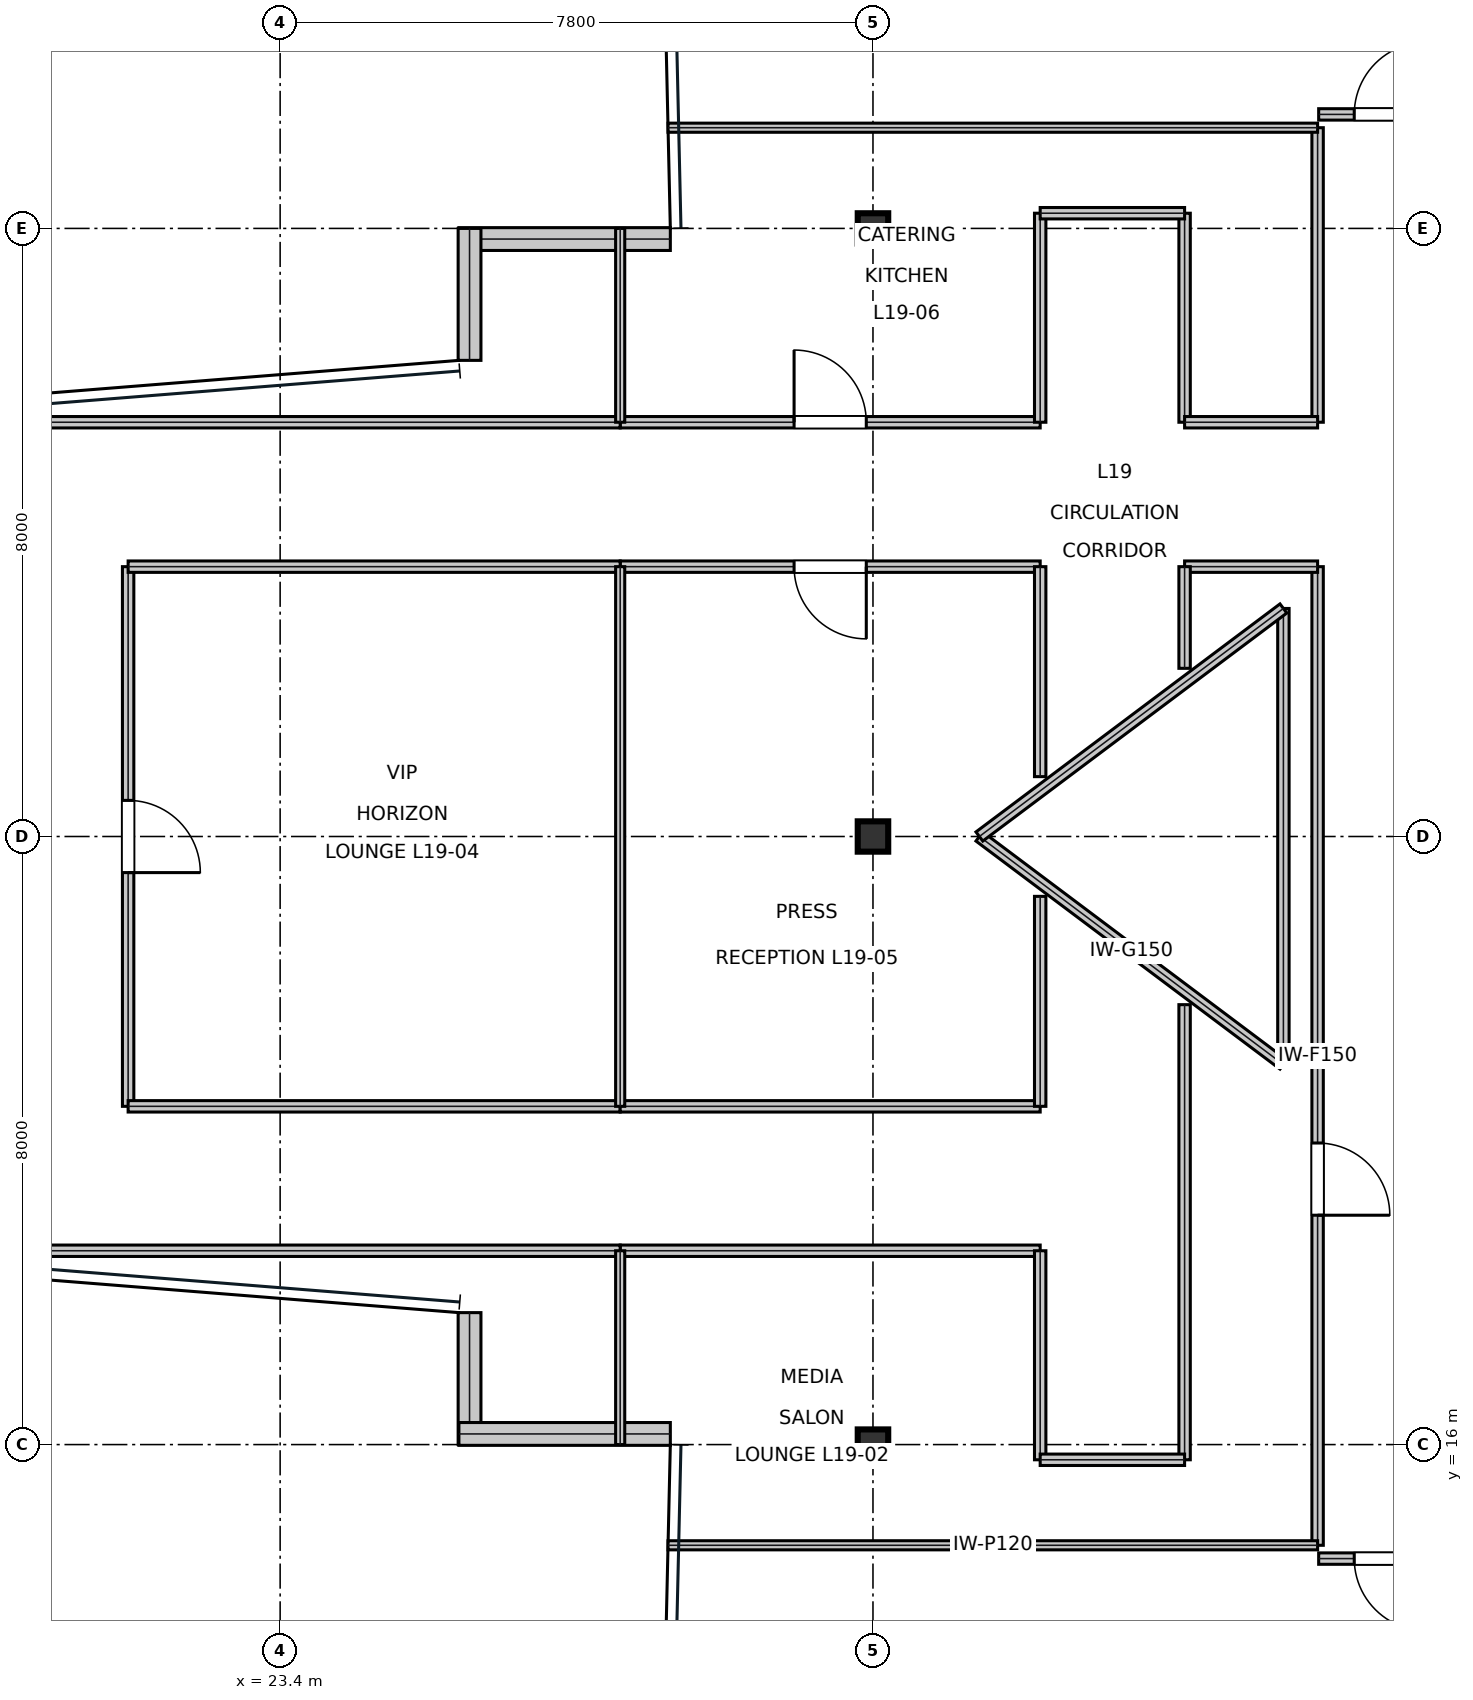
"""IFC4 building model, lengths in metres.
Left out: names, types, materials, properties, quantities, classifications, styles, units other than length and angle.
Written with IfcOpenShell. Run it as: python <this file> out.ifc"""

import sys

from ifc_helpers import new_model, si_unit, direction, frame, frame_2d, origin, origin_2d, place, context, subcontext, project, spatial, rectangle, i_section, extrude, element, fill, save


model = new_model("IFC4")
c1 = context("Model", 3, precision=1e-05, world=origin(), true_north=direction((0.0, 1.0)))
c2 = subcontext(c1, "Body", "Model", "MODEL_VIEW")
j1 = project(units=[si_unit("LENGTHUNIT", "METRE"), si_unit("PLANEANGLEUNIT", "RADIAN")], contexts=[c1])
p1 = place(None, origin())
s1 = spatial("IfcSite", under=j1, at=p1, CompositionType="ELEMENT")
p2 = place(p1, origin())
s2 = spatial("IfcBuilding", under=s1, at=p2, CompositionType="ELEMENT")
p3 = place(p2, frame((0.0, 0.0, 86.4)))
s3 = spatial("IfcBuildingStorey", under=s2, at=p3, CompositionType="ELEMENT", Elevation=86.4)
for number, where, z_axis, x_axis in (
    (1, (31.2, 16.0, 0.0), (0.0, 0.0, 1.0), (1.0, 0.0, 0.0)),
    (2, (31.2, 24.0, 0.0), (0.0, 0.0, 1.0), (1.0, 0.0, 0.0)),
    (3, (31.2, 32.0, 0.0), (0.0, 0.0, 1.0), (1.0, 0.0, 0.0)),
):
    element("IfcColumn", number, at=place(p3, frame(where, z_axis=z_axis, x_axis=x_axis)), inside=s3, PredefinedType="COLUMN", context=c2, shape_type="SweptSolid", body=[
        extrude(i_section(OverallWidth=0.401, OverallDepth=0.399, WebThickness=0.025, FlangeThickness=0.04, at=origin_2d()), origin(), (0.0, 0.0, 1.0), 4.044),
    ])
p4 = place(p3, frame((28.534, 31.86, 0.0), z_axis=(0.0, 0.0, 1.0), x_axis=(-1.0, 0.0, 0.0)))
e4 = element("IfcWall", 4, at=p4, inside=s3, PredefinedType="STANDARD", context=c2, shape_type="SweptSolid", body=[
    extrude(rectangle(XDim=2.782, YDim=0.3, at=frame_2d((1.391, 0.0))), origin(), (0.0, 0.0, 1.0), 3.81),
])
for number, where, z_axis, x_axis in (
    (5, (25.892, 32.0, 0.0), (0.0, 0.0, 1.0), (0.0, -1.0, 0.0)),
    (6, (25.892, 17.736, 0.0), (0.0, 0.0, 1.0), (0.0, -1.0, 0.0)),
):
    element("IfcWall", number, at=place(p3, frame(where, z_axis=z_axis, x_axis=x_axis)), inside=s3, PredefinedType="STANDARD", context=c2, shape_type="SweptSolid", body=[
        extrude(rectangle(XDim=1.736, YDim=0.3, at=frame_2d((0.868, 0.0))), origin(), (0.0, 0.0, 1.0), 3.338),
    ])
p5 = place(p3, frame((25.752, 16.14, 0.0), z_axis=(0.0, 0.0, 1.0), x_axis=(1.0, 0.0, 0.0)))
e7 = element("IfcWall", 7, at=p5, inside=s3, PredefinedType="STANDARD", context=c2, shape_type="SweptSolid", body=[
    extrude(rectangle(XDim=2.782, YDim=0.3, at=frame_2d((1.391, 0.0))), origin(), (0.0, 0.0, 1.0), 3.81),
])
p6 = place(p3, frame((37.064, 14.5, 0.0), z_axis=(0.0, 0.0, 1.0), x_axis=(1.0, 0.0, 0.0)))
e8 = element("IfcWall", 8, at=p6, inside=s3, PredefinedType="PARTITIONING", context=c2, shape_type="SweptSolid", body=[
    extrude(rectangle(XDim=1.886, YDim=0.15, at=frame_2d((0.943, 0.0))), origin(), (0.0, 0.0, 1.0), 3.181),
])
p7 = place(p6, frame((0.468, 0.0, 0.0)))
e9 = element("IfcOpeningElement", 9, at=p7, cuts=e8, PredefinedType="OPENING", context=c2, shape_type="SweptSolid", body=[
    extrude(rectangle(XDim=0.95, YDim=2.15, at=frame_2d((0.475, 1.075))), frame((0.0, 0.085, 0.0), z_axis=(0.0, -1.0, 0.0), x_axis=(1.0, 0.0, 0.0)), (0.0, 0.0, 1.0), 0.17),
])
p8 = place(p3, frame((37.05, 14.675, 0.0), z_axis=(0.0, 0.0, 1.0), x_axis=(0.0, 1.0, 0.0)))
e10 = element("IfcWall", 10, at=p8, inside=s3, PredefinedType="PARTITIONING", context=c2, shape_type="SweptSolid", body=[
    extrude(rectangle(XDim=12.875, YDim=0.15, at=frame_2d((6.438, 0.0))), origin(), (0.0, 0.0, 1.0), 3.181),
])
p9 = place(p8, frame((4.343, 0.0, 0.0)))
e11 = element("IfcOpeningElement", 11, at=p9, cuts=e10, PredefinedType="OPENING", context=c2, shape_type="SweptSolid", body=[
    extrude(rectangle(XDim=0.95, YDim=2.15, at=frame_2d((0.475, 1.075))), frame((0.0, 0.085, 0.0), z_axis=(0.0, -1.0, 0.0), x_axis=(1.0, 0.0, 0.0)), (0.0, 0.0, 1.0), 0.17),
])
p10 = place(p3, frame((21.4, 20.45, 0.0), z_axis=(0.0, 0.0, 1.0), x_axis=(0.0, 1.0, 0.0)))
e12 = element("IfcWall", 12, at=p10, inside=s3, PredefinedType="PARTITIONING", context=c2, shape_type="SweptSolid", body=[
    extrude(rectangle(XDim=7.1, YDim=0.15, at=frame_2d((3.55, 0.0))), origin(), (0.0, 0.0, 1.0), 3.181),
])
p11 = place(p10, frame((3.075, 0.0, 0.0)))
e13 = element("IfcOpeningElement", 13, at=p11, cuts=e12, PredefinedType="OPENING", context=c2, shape_type="SweptSolid", body=[
    extrude(rectangle(XDim=0.95, YDim=2.15, at=frame_2d((0.475, 1.075))), frame((0.0, 0.085, 0.0), z_axis=(0.0, -1.0, 0.0), x_axis=(1.0, 0.0, 0.0)), (0.0, 0.0, 1.0), 0.17),
])
p12 = place(p3, frame((27.874, 27.55, 0.0), z_axis=(0.0, 0.0, 1.0), x_axis=(1.0, 0.0, 0.0)))
e14 = element("IfcWall", 14, at=p12, inside=s3, PredefinedType="PARTITIONING", context=c2, shape_type="SweptSolid", body=[
    extrude(rectangle(XDim=5.526, YDim=0.15, at=frame_2d((2.763, 0.0))), origin(), (0.0, 0.0, 1.0), 3.181),
])
p13 = place(p12, frame((2.288, 0.0, 0.0)))
e15 = element("IfcOpeningElement", 15, at=p13, cuts=e14, PredefinedType="OPENING", context=c2, shape_type="SweptSolid", body=[
    extrude(rectangle(XDim=0.95, YDim=2.15, at=frame_2d((0.475, 1.075))), frame((0.0, 0.085, 0.0), z_axis=(0.0, -1.0, 0.0), x_axis=(1.0, 0.0, 0.0)), (0.0, 0.0, 1.0), 0.17),
])
p14 = place(p3, frame((27.874, 29.45, 0.0), z_axis=(0.0, 0.0, 1.0), x_axis=(1.0, 0.0, 0.0)))
e16 = element("IfcWall", 16, at=p14, inside=s3, PredefinedType="PARTITIONING", context=c2, shape_type="SweptSolid", body=[
    extrude(rectangle(XDim=5.526, YDim=0.15, at=frame_2d((2.763, 0.0))), origin(), (0.0, 0.0, 1.0), 3.181),
])
p15 = place(p14, frame((2.288, 0.0, 0.0)))
e17 = element("IfcOpeningElement", 17, at=p15, cuts=e16, PredefinedType="OPENING", context=c2, shape_type="SweptSolid", body=[
    extrude(rectangle(XDim=0.95, YDim=2.15, at=frame_2d((0.475, 1.075))), frame((0.0, 0.085, 0.0), z_axis=(0.0, -1.0, 0.0), x_axis=(1.0, 0.0, 0.0)), (0.0, 0.0, 1.0), 0.17),
])
p16 = place(p3, frame((37.064, 33.5, 0.0), z_axis=(0.0, 0.0, 1.0), x_axis=(1.0, 0.0, 0.0)))
e18 = element("IfcWall", 18, at=p16, inside=s3, PredefinedType="PARTITIONING", context=c2, shape_type="SweptSolid", body=[
    extrude(rectangle(XDim=1.886, YDim=0.15, at=frame_2d((0.943, 0.0))), origin(), (0.0, 0.0, 1.0), 3.181),
])
p17 = place(p16, frame((0.468, 0.0, 0.0)))
e19 = element("IfcOpeningElement", 19, at=p17, cuts=e18, PredefinedType="OPENING", context=c2, shape_type="SweptSolid", body=[
    extrude(rectangle(XDim=0.95, YDim=2.15, at=frame_2d((0.475, 1.075))), frame((0.0, 0.085, 0.0), z_axis=(0.0, -1.0, 0.0), x_axis=(1.0, 0.0, 0.0)), (0.0, 0.0, 1.0), 0.17),
])
p18 = place(p3, frame((35.3, 15.8, 0.0), z_axis=(0.0, 0.0, 1.0), x_axis=(0.0, 1.0, 0.0)))
e20 = element("IfcWall", 20, at=p18, inside=s3, PredefinedType="PARTITIONING", context=c2, shape_type="SweptSolid", body=[
    extrude(rectangle(XDim=5.988, YDim=0.15, at=frame_2d((2.994, 0.0))), origin(), (0.0, 0.0, 1.0), 3.181),
])
p19 = place(p3, frame((27.874, 18.55, 0.0), z_axis=(0.0, 0.0, 1.0), x_axis=(1.0, 0.0, 0.0)))
e21 = element("IfcWall", 21, at=p19, inside=s3, PredefinedType="PARTITIONING", context=c2, shape_type="SweptSolid", body=[
    extrude(rectangle(XDim=5.526, YDim=0.15, at=frame_2d((2.763, 0.0))), origin(), (0.0, 0.0, 1.0), 3.181),
])
p20 = place(p3, frame((33.4, 15.8, 0.0), z_axis=(0.0, 0.0, 1.0), x_axis=(0.0, 1.0, 0.0)))
e22 = element("IfcWall", 22, at=p20, inside=s3, PredefinedType="PARTITIONING", context=c2, shape_type="SweptSolid", body=[
    extrude(rectangle(XDim=2.75, YDim=0.15, at=frame_2d((1.375, 0.0))), origin(), (0.0, 0.0, 1.0), 3.181),
])
p21 = place(p3, frame((33.4, 15.8, 0.0), z_axis=(0.0, 0.0, 1.0), x_axis=(1.0, 0.0, 0.0)))
e23 = element("IfcWall", 23, at=p21, inside=s3, PredefinedType="PARTITIONING", context=c2, shape_type="SweptSolid", body=[
    extrude(rectangle(XDim=1.9, YDim=0.15, at=frame_2d((0.95, 0.0))), origin(), (0.0, 0.0, 1.0), 3.181),
])
p22 = place(p3, frame((35.3, 27.55, 0.0), z_axis=(0.0, 0.0, 1.0), x_axis=(1.0, 0.0, 0.0)))
e24 = element("IfcWall", 24, at=p22, inside=s3, PredefinedType="PARTITIONING", context=c2, shape_type="SweptSolid", body=[
    extrude(rectangle(XDim=1.75, YDim=0.15, at=frame_2d((0.875, 0.0))), origin(), (0.0, 0.0, 1.0), 3.391),
])
p23 = place(p3, frame((35.3, 26.212, 0.0), z_axis=(0.0, 0.0, 1.0), x_axis=(0.0, 1.0, 0.0)))
e25 = element("IfcWall", 25, at=p23, inside=s3, PredefinedType="PARTITIONING", context=c2, shape_type="SweptSolid", body=[
    extrude(rectangle(XDim=1.338, YDim=0.15, at=frame_2d((0.669, 0.0))), origin(), (0.0, 0.0, 1.0), 3.81),
])
for number, where, z_axis, x_axis in (
    (26, (15.674, 18.55, 0.0), (0.0, 0.0, 1.0), (1.0, 0.0, 0.0)),
    (27, (15.674, 29.45, 0.0), (0.0, 0.0, 1.0), (1.0, 0.0, 0.0)),
):
    element("IfcWall", number, at=place(p3, frame(where, z_axis=z_axis, x_axis=x_axis)), inside=s3, PredefinedType="PARTITIONING", context=c2, shape_type="SweptSolid", body=[
        extrude(rectangle(XDim=12.2, YDim=0.15, at=frame_2d((6.1, 0.0))), origin(), (0.0, 0.0, 1.0), 3.338),
    ])
for number, where, z_axis, x_axis in (
    (28, (21.4, 27.55, 0.0), (0.0, 0.0, 1.0), (1.0, 0.0, 0.0)),
    (29, (21.4, 20.45, 0.0), (0.0, 0.0, 1.0), (1.0, 0.0, 0.0)),
):
    element("IfcWall", number, at=place(p3, frame(where, z_axis=z_axis, x_axis=x_axis)), inside=s3, PredefinedType="PARTITIONING", context=c2, shape_type="SweptSolid", body=[
        extrude(rectangle(XDim=6.474, YDim=0.15, at=frame_2d((3.237, 0.0))), origin(), (0.0, 0.0, 1.0), 3.391),
    ])
p24 = place(p3, frame((27.874, 20.45, 0.0), z_axis=(0.0, 0.0, 1.0), x_axis=(1.0, 0.0, 0.0)))
e30 = element("IfcWall", 30, at=p24, inside=s3, PredefinedType="PARTITIONING", context=c2, shape_type="SweptSolid", body=[
    extrude(rectangle(XDim=5.526, YDim=0.15, at=frame_2d((2.763, 0.0))), origin(), (0.0, 0.0, 1.0), 3.181),
])
for number, where, z_axis, x_axis in (
    (31, (33.4, 24.788, 0.0), (0.0, 0.0, 1.0), (0.0, 1.0, 0.0)),
    (32, (33.4, 20.45, 0.0), (0.0, 0.0, 1.0), (0.0, 1.0, 0.0)),
):
    element("IfcWall", number, at=place(p3, frame(where, z_axis=z_axis, x_axis=x_axis)), inside=s3, PredefinedType="PARTITIONING", context=c2, shape_type="SweptSolid", body=[
        extrude(rectangle(XDim=2.762, YDim=0.15, at=frame_2d((1.381, 0.0))), origin(), (0.0, 0.0, 1.0), 3.81),
    ])
p25 = place(p3, frame((37.05, 29.45, 0.0), z_axis=(0.0, 0.0, 1.0), x_axis=(0.0, 1.0, 0.0)))
e33 = element("IfcWall", 33, at=p25, inside=s3, PredefinedType="PARTITIONING", context=c2, shape_type="SweptSolid", body=[
    extrude(rectangle(XDim=3.875, YDim=0.15, at=frame_2d((1.938, 0.0))), origin(), (0.0, 0.0, 1.0), 3.181),
])
for number, where, z_axis, x_axis in (
    (34, (33.4, 29.45, 0.0), (0.0, 0.0, 1.0), (0.0, 1.0, 0.0)),
    (35, (35.3, 29.45, 0.0), (0.0, 0.0, 1.0), (0.0, 1.0, 0.0)),
):
    element("IfcWall", number, at=place(p3, frame(where, z_axis=z_axis, x_axis=x_axis)), inside=s3, PredefinedType="PARTITIONING", context=c2, shape_type="SweptSolid", body=[
        extrude(rectangle(XDim=2.75, YDim=0.15, at=frame_2d((1.375, 0.0))), origin(), (0.0, 0.0, 1.0), 3.181),
    ])
p26 = place(p3, frame((33.4, 32.2, 0.0), z_axis=(0.0, 0.0, 1.0), x_axis=(1.0, 0.0, 0.0)))
e36 = element("IfcWall", 36, at=p26, inside=s3, PredefinedType="PARTITIONING", context=c2, shape_type="SweptSolid", body=[
    extrude(rectangle(XDim=1.9, YDim=0.15, at=frame_2d((0.95, 0.0))), origin(), (0.0, 0.0, 1.0), 3.181),
])
p27 = place(p3, frame((35.3, 29.45, 0.0), z_axis=(0.0, 0.0, 1.0), x_axis=(1.0, 0.0, 0.0)))
e37 = element("IfcWall", 37, at=p27, inside=s3, PredefinedType="PARTITIONING", context=c2, shape_type="SweptSolid", body=[
    extrude(rectangle(XDim=1.75, YDim=0.15, at=frame_2d((0.875, 0.0))), origin(), (0.0, 0.0, 1.0), 3.81),
])
p28 = place(p3, frame((28.504, 14.675, 0.0), z_axis=(0.0, 0.0, 1.0), x_axis=(1.0, 0.0, 0.0)))
e38 = element("IfcWall", 38, at=p28, inside=s3, PredefinedType="PARTITIONING", context=c2, shape_type="SweptSolid", body=[
    extrude(rectangle(XDim=8.546, YDim=0.12, at=frame_2d((4.273, 0.0))), origin(), (0.0, 0.0, 1.0), 3.338),
])
for number, where, z_axis, x_axis in (
    (39, (27.874, 16.0, 0.0), (0.0, 0.0, 1.0), (0.0, 1.0, 0.0)),
    (40, (27.874, 29.45, 0.0), (0.0, 0.0, 1.0), (0.0, 1.0, 0.0)),
):
    element("IfcWall", number, at=place(p3, frame(where, z_axis=z_axis, x_axis=x_axis)), inside=s3, PredefinedType="PARTITIONING", context=c2, shape_type="SweptSolid", body=[
        extrude(rectangle(XDim=2.55, YDim=0.12, at=frame_2d((1.275, 0.0))), origin(), (0.0, 0.0, 1.0), 3.338),
    ])
p29 = place(p3, frame((27.874, 20.45, 0.0), z_axis=(0.0, 0.0, 1.0), x_axis=(0.0, 1.0, 0.0)))
e41 = element("IfcWall", 41, at=p29, inside=s3, PredefinedType="PARTITIONING", context=c2, shape_type="SweptSolid", body=[
    extrude(rectangle(XDim=7.1, YDim=0.12, at=frame_2d((3.55, 0.0))), origin(), (0.0, 0.0, 1.0), 3.181),
])
p30 = place(p3, frame((28.504, 33.325, 0.0), z_axis=(0.0, 0.0, 1.0), x_axis=(1.0, 0.0, 0.0)))
e42 = element("IfcWall", 42, at=p30, inside=s3, PredefinedType="PARTITIONING", context=c2, shape_type="SweptSolid", body=[
    extrude(rectangle(XDim=8.546, YDim=0.12, at=frame_2d((4.273, 0.0))), origin(), (0.0, 0.0, 1.0), 3.338),
])
p31 = place(p3, frame((32.6, 24.0, 0.0), z_axis=(0.0, 0.0, 1.0), x_axis=(0.8, -0.6, 0.0)))
e43 = element("IfcWall", 43, at=p31, inside=s3, PredefinedType="MOVABLE", context=c2, shape_type="SweptSolid", body=[
    extrude(rectangle(XDim=5.0, YDim=0.15, at=frame_2d((2.5, 0.0))), origin(), (0.0, 0.0, 1.0), 3.81),
])
p32 = place(p3, frame((36.6, 21.0, 0.0), z_axis=(0.0, 0.0, 1.0), x_axis=(0.0, 1.0, 0.0)))
e44 = element("IfcWall", 44, at=p32, inside=s3, PredefinedType="MOVABLE", context=c2, shape_type="SweptSolid", body=[
    extrude(rectangle(XDim=6.0, YDim=0.15, at=frame_2d((3.0, 0.0))), origin(), (0.0, 0.0, 1.0), 3.81),
])
p33 = place(p3, frame((36.6, 27.0, 0.0), z_axis=(0.0, 0.0, 1.0), x_axis=(-0.8, -0.6, 0.0)))
e45 = element("IfcWall", 45, at=p33, inside=s3, PredefinedType="MOVABLE", context=c2, shape_type="SweptSolid", body=[
    extrude(rectangle(XDim=5.0, YDim=0.15, at=frame_2d((2.5, 0.0))), origin(), (0.0, 0.0, 1.0), 3.81),
])
p34 = place(p7, frame((0.95, 0.0, 0.0), z_axis=(0.0, 0.0, 1.0), x_axis=(-1.0, 0.0, 0.0)))
e46 = element("IfcDoor", 46, at=p34, inside=s3, OperationType="SINGLE_SWING_LEFT", PredefinedType="DOOR", context=c2, shape_type="SweptSolid", body=[
    extrude(rectangle(XDim=0.95, YDim=2.15, at=frame_2d((0.475, 1.075))), frame((0.0, 0.025, 0.0), z_axis=(0.0, -1.0, 0.0), x_axis=(1.0, 0.0, 0.0)), (0.0, 0.0, 1.0), 0.05),
])
fill(e9, e46)
p35 = place(p9, frame((0.95, 0.0, 0.0), z_axis=(0.0, 0.0, 1.0), x_axis=(-1.0, 0.0, 0.0)))
e47 = element("IfcDoor", 47, at=p35, inside=s3, OperationType="SINGLE_SWING_RIGHT", PredefinedType="DOOR", context=c2, shape_type="SweptSolid", body=[
    extrude(rectangle(XDim=0.95, YDim=2.15, at=frame_2d((0.475, 1.075))), frame((0.0, 0.025, 0.0), z_axis=(0.0, -1.0, 0.0), x_axis=(1.0, 0.0, 0.0)), (0.0, 0.0, 1.0), 0.05),
])
fill(e11, e47)
p36 = place(p11, frame((0.95, 0.0, 0.0), z_axis=(0.0, 0.0, 1.0), x_axis=(-1.0, 0.0, 0.0)))
e48 = element("IfcDoor", 48, at=p36, inside=s3, OperationType="SINGLE_SWING_RIGHT", PredefinedType="DOOR", context=c2, shape_type="SweptSolid", body=[
    extrude(rectangle(XDim=0.95, YDim=2.15, at=frame_2d((0.475, 1.075))), frame((0.0, 0.025, 0.0), z_axis=(0.0, -1.0, 0.0), x_axis=(1.0, 0.0, 0.0)), (0.0, 0.0, 1.0), 0.05),
])
fill(e13, e48)
p37 = place(p13, frame((0.95, 0.0, 0.0), z_axis=(0.0, 0.0, 1.0), x_axis=(-1.0, 0.0, 0.0)))
e49 = element("IfcDoor", 49, at=p37, inside=s3, OperationType="SINGLE_SWING_LEFT", PredefinedType="DOOR", context=c2, shape_type="SweptSolid", body=[
    extrude(rectangle(XDim=0.95, YDim=2.15, at=frame_2d((0.475, 1.075))), frame((0.0, 0.025, 0.0), z_axis=(0.0, -1.0, 0.0), x_axis=(1.0, 0.0, 0.0)), (0.0, 0.0, 1.0), 0.05),
])
fill(e15, e49)
p38 = place(p15, origin())
e50 = element("IfcDoor", 50, at=p38, inside=s3, OperationType="SINGLE_SWING_LEFT", PredefinedType="DOOR", context=c2, shape_type="SweptSolid", body=[
    extrude(rectangle(XDim=0.95, YDim=2.15, at=frame_2d((0.475, 1.075))), frame((0.0, 0.025, 0.0), z_axis=(0.0, -1.0, 0.0), x_axis=(1.0, 0.0, 0.0)), (0.0, 0.0, 1.0), 0.05),
])
fill(e17, e50)
p39 = place(p17, origin())
e51 = element("IfcDoor", 51, at=p39, inside=s3, OperationType="SINGLE_SWING_RIGHT", PredefinedType="DOOR", context=c2, shape_type="SweptSolid", body=[
    extrude(rectangle(XDim=0.95, YDim=2.15, at=frame_2d((0.475, 1.075))), frame((0.0, 0.025, 0.0), z_axis=(0.0, -1.0, 0.0), x_axis=(1.0, 0.0, 0.0)), (0.0, 0.0, 1.0), 0.05),
])
fill(e19, e51)
save(model, sys.argv[1])
